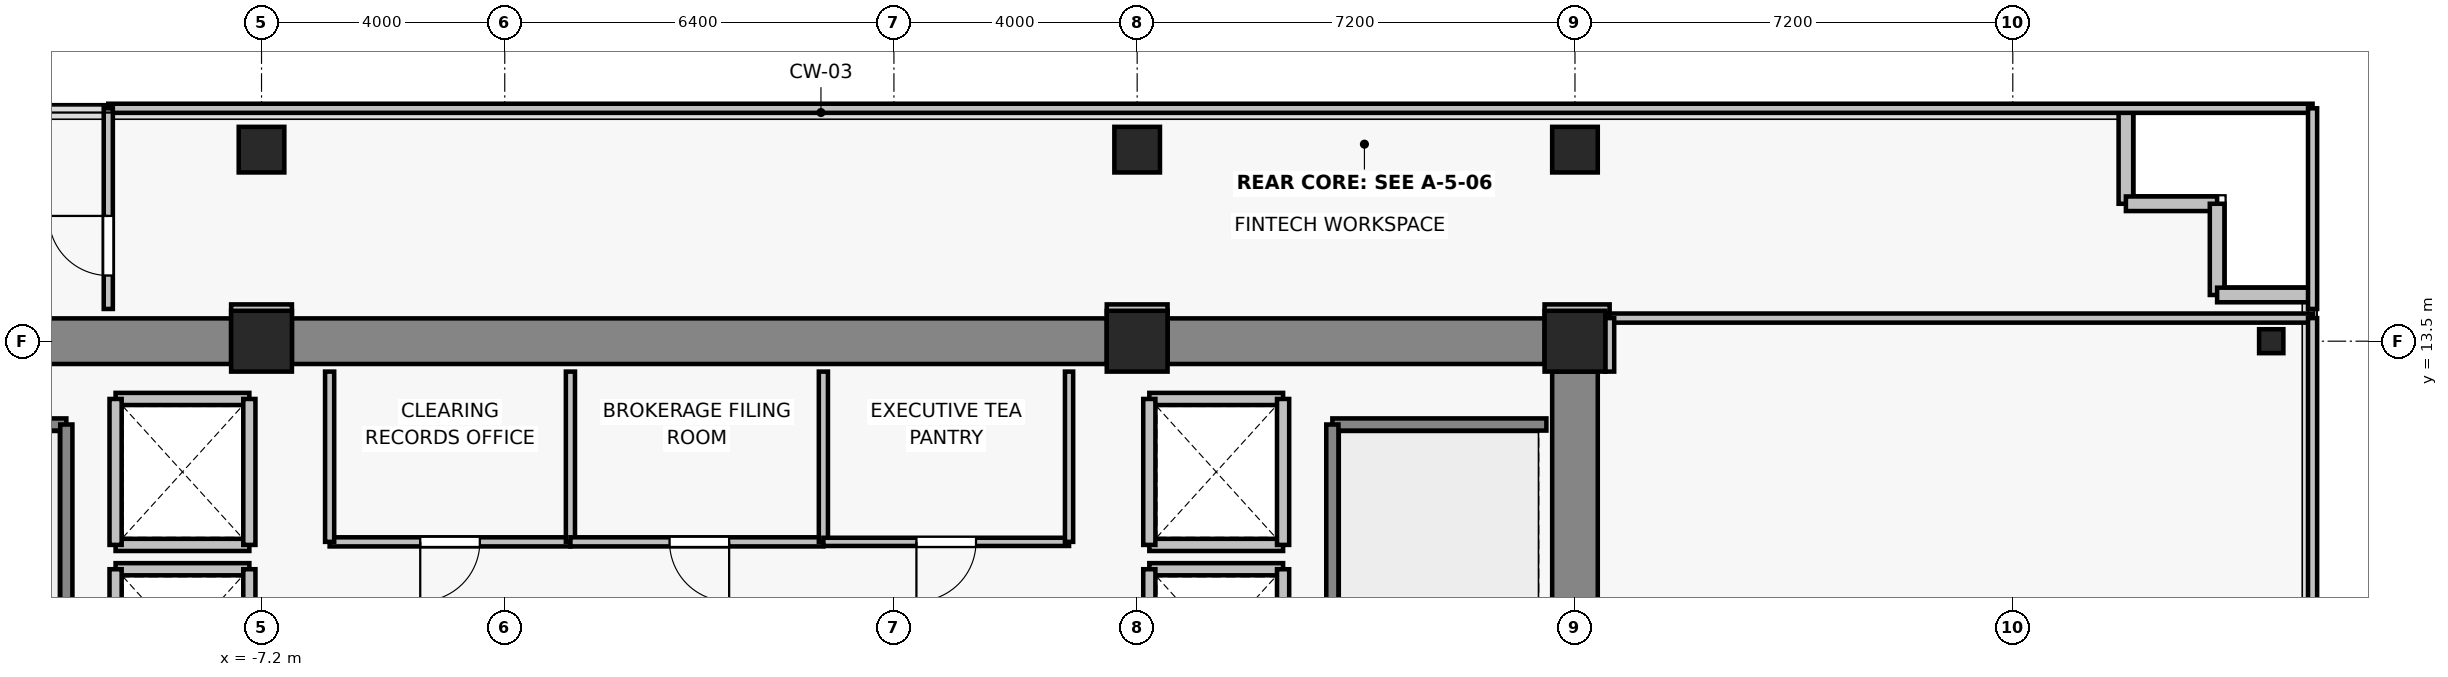
"""IFC4 building model, lengths in metres.
Left out: names, types, materials, properties, quantities, classifications, styles, units other than length and angle.
Written with IfcOpenShell. Run it as: python <this file> out.ifc"""

import sys

from ifc_helpers import new_model, si_unit, direction, frame, frame_2d, origin, origin_2d, place, context, subcontext, project, spatial, rectangle, i_section, extrude, source, transform, mapped, element, fill, save


model = new_model("IFC4")
c1 = context("Model", 3, precision=1e-05, world=origin(), true_north=direction((0.0, 1.0)))
c2 = subcontext(c1, "Body", "Model", "MODEL_VIEW")
j1 = project(units=[si_unit("LENGTHUNIT", "METRE"), si_unit("PLANEANGLEUNIT", "RADIAN")], contexts=[c1])
p1 = place(None, origin())
s1 = spatial("IfcSite", under=j1, at=p1, CompositionType="ELEMENT")
p2 = place(p1, origin())
s2 = spatial("IfcBuilding", under=s1, at=p2, CompositionType="ELEMENT")
p3 = place(p2, frame((0.0, 0.0, 179.2)))
s3 = spatial("IfcBuildingStorey", under=s2, at=p3, CompositionType="ELEMENT", Elevation=179.2)
for number, where, z_axis, x_axis in (
    (1, (-7.2, 13.5, 0.0), (0.0, 0.0, 1.0), (1.0, 0.0, 0.0)),
    (2, (7.2, 13.5, 0.0), (0.0, 0.0, 1.0), (1.0, 0.0, 0.0)),
    (3, (14.4, 13.5, 0.0), (0.0, 0.0, 1.0), (1.0, 0.0, 0.0)),
):
    element("IfcColumn", number, at=place(p3, frame(where, z_axis=z_axis, x_axis=x_axis)), inside=s3, PredefinedType="COLUMN", context=c2, shape_type="SweptSolid", body=[
        extrude(rectangle(XDim=1.0, YDim=1.0, at=origin_2d()), origin(), (0.0, 0.0, 1.0), 3.3),
    ])
for number, where, z_axis, x_axis in (
    (4, (-7.2, 16.65, 0.0), (0.0, 0.0, 1.0), (1.0, 0.0, 0.0)),
    (5, (7.2, 16.65, 0.0), (0.0, 0.0, 1.0), (1.0, 0.0, 0.0)),
    (6, (14.4, 16.65, 0.0), (0.0, 0.0, 1.0), (1.0, 0.0, 0.0)),
):
    element("IfcColumn", number, at=place(p3, frame(where, z_axis=z_axis, x_axis=x_axis)), inside=s3, PredefinedType="COLUMN", context=c2, shape_type="SweptSolid", body=[
        extrude(rectangle(XDim=0.75, YDim=0.75, at=origin_2d()), origin(), (0.0, 0.0, 1.0), 3.3),
    ])
p4 = place(p3, frame((25.85, 13.5, 0.0), z_axis=(0.0, 0.0, 1.0), x_axis=(1.0, 0.0, 0.0)))
e7 = element("IfcColumn", 7, at=p4, inside=s3, PredefinedType="COLUMN", context=c2, shape_type="SweptSolid", body=[
    extrude(i_section(OverallWidth=0.399, OverallDepth=0.394, WebThickness=0.023, FlangeThickness=0.037, FilletRadius=0.015, at=origin_2d()), origin(), (0.0, 0.0, 1.0), 3.3),
])
p5 = place(p3, frame((-13.9, 13.5, 0.0), z_axis=(0.0, 0.0, 1.0), x_axis=(1.0, 0.0, 0.0)))
e8 = element("IfcWall", 8, at=p5, inside=s3, PredefinedType="SHEAR", context=c2, shape_type="SweptSolid", body=[
    extrude(rectangle(XDim=6.2, YDim=0.75, at=frame_2d((3.1, 0.0))), origin(), (0.0, 0.0, 1.0), 3.075),
])
p6 = place(p3, frame((-6.7, 13.5, 0.0), z_axis=(0.0, 0.0, 1.0), x_axis=(1.0, 0.0, 0.0)))
e9 = element("IfcWall", 9, at=p6, inside=s3, PredefinedType="SHEAR", context=c2, shape_type="SweptSolid", body=[
    extrude(rectangle(XDim=13.4, YDim=0.75, at=frame_2d((6.7, 0.0))), origin(), (0.0, 0.0, 1.0), 3.075),
])
p7 = place(p3, frame((7.7, 13.5, 0.0), z_axis=(0.0, 0.0, 1.0), x_axis=(1.0, 0.0, 0.0)))
e10 = element("IfcWall", 10, at=p7, inside=s3, PredefinedType="SHEAR", context=c2, shape_type="SweptSolid", body=[
    extrude(rectangle(XDim=6.2, YDim=0.75, at=frame_2d((3.1, 0.0))), origin(), (0.0, 0.0, 1.0), 3.075),
])
p8 = place(p3, frame((14.4, 7.1, 0.0), z_axis=(0.0, 0.0, 1.0), x_axis=(0.0, 1.0, 0.0)))
e11 = element("IfcWall", 11, at=p8, inside=s3, PredefinedType="SHEAR", context=c2, shape_type="SweptSolid", body=[
    extrude(rectangle(XDim=5.9, YDim=0.75, at=frame_2d((2.95, 0.0))), origin(), (0.0, 0.0, 1.0), 3.075),
])
for number, where, z_axis, x_axis in (
    (12, (23.46, 15.76, 0.0), (0.0, 0.0, 1.0), (0.0, 1.0, 0.0)),
    (13, (24.96, 15.76, 0.0), (0.0, 0.0, 1.0), (-1.0, 0.0, 0.0)),
    (14, (24.96, 14.26, 0.0), (0.0, 0.0, 1.0), (0.0, 1.0, 0.0)),
    (15, (26.46, 14.26, 0.0), (0.0, 0.0, 1.0), (-1.0, 0.0, 0.0)),
):
    element("IfcWall", number, at=place(p3, frame(where, z_axis=z_axis, x_axis=x_axis)), inside=s3, PredefinedType="SOLIDWALL", context=c2, shape_type="SweptSolid", body=[
        extrude(rectangle(XDim=1.5, YDim=0.24, at=frame_2d((0.75, 0.0))), origin(), (0.0, 0.0, 1.0), 3.075),
    ])
p9 = place(p3, frame((-9.6, 9.75, 0.0), z_axis=(0.0, 0.0, 1.0), x_axis=(1.0, 0.0, 0.0)))
e16 = element("IfcWall", 16, at=p9, inside=s3, PredefinedType="SOLIDWALL", context=c2, shape_type="SweptSolid", body=[
    extrude(rectangle(XDim=2.2, YDim=0.2, at=frame_2d((1.1, 0.0))), origin(), (0.0, 0.0, 1.0), 2.565),
])
p10 = place(p3, frame((-9.6, 7.35, 0.0), z_axis=(0.0, 0.0, 1.0), x_axis=(0.0, 1.0, 0.0)))
e17 = element("IfcWall", 17, at=p10, inside=s3, PredefinedType="SOLIDWALL", context=c2, shape_type="SweptSolid", body=[
    extrude(rectangle(XDim=2.4, YDim=0.2, at=frame_2d((1.2, 0.0))), origin(), (0.0, 0.0, 1.0), 3.075),
])
p11 = place(p3, frame((-7.4, 9.75, 0.0), z_axis=(0.0, 0.0, 1.0), x_axis=(0.0, -1.0, 0.0)))
e18 = element("IfcWall", 18, at=p11, inside=s3, PredefinedType="SOLIDWALL", context=c2, shape_type="SweptSolid", body=[
    extrude(rectangle(XDim=2.4, YDim=0.2, at=frame_2d((1.2, 0.0))), origin(), (0.0, 0.0, 1.0), 2.565),
])
for number, where, z_axis, x_axis in (
    (19, (-7.4, 10.15, 0.0), (0.0, 0.0, 1.0), (-1.0, 0.0, 0.0)),
    (20, (-9.6, 12.55, 0.0), (0.0, 0.0, 1.0), (1.0, 0.0, 0.0)),
):
    element("IfcWall", number, at=place(p3, frame(where, z_axis=z_axis, x_axis=x_axis)), inside=s3, PredefinedType="SOLIDWALL", context=c2, shape_type="SweptSolid", body=[
        extrude(rectangle(XDim=2.2, YDim=0.2, at=frame_2d((1.1, 0.0))), origin(), (0.0, 0.0, 1.0), 2.565),
    ])
p12 = place(p3, frame((-9.6, 10.15, 0.0), z_axis=(0.0, 0.0, 1.0), x_axis=(0.0, 1.0, 0.0)))
e21 = element("IfcWall", 21, at=p12, inside=s3, PredefinedType="SOLIDWALL", context=c2, shape_type="SweptSolid", body=[
    extrude(rectangle(XDim=2.4, YDim=0.2, at=frame_2d((1.2, 0.0))), origin(), (0.0, 0.0, 1.0), 3.075),
])
p13 = place(p3, frame((-7.4, 12.55, 0.0), z_axis=(0.0, 0.0, 1.0), x_axis=(0.0, -1.0, 0.0)))
e22 = element("IfcWall", 22, at=p13, inside=s3, PredefinedType="SOLIDWALL", context=c2, shape_type="SweptSolid", body=[
    extrude(rectangle(XDim=2.4, YDim=0.2, at=frame_2d((1.2, 0.0))), origin(), (0.0, 0.0, 1.0), 2.565),
])
p14 = place(p3, frame((7.4, 9.75, 0.0), z_axis=(0.0, 0.0, 1.0), x_axis=(1.0, 0.0, 0.0)))
e23 = element("IfcWall", 23, at=p14, inside=s3, PredefinedType="SOLIDWALL", context=c2, shape_type="SweptSolid", body=[
    extrude(rectangle(XDim=2.2, YDim=0.2, at=frame_2d((1.1, 0.0))), origin(), (0.0, 0.0, 1.0), 2.565),
])
p15 = place(p3, frame((7.4, 7.35, 0.0), z_axis=(0.0, 0.0, 1.0), x_axis=(0.0, 1.0, 0.0)))
e24 = element("IfcWall", 24, at=p15, inside=s3, PredefinedType="SOLIDWALL", context=c2, shape_type="SweptSolid", body=[
    extrude(rectangle(XDim=2.4, YDim=0.2, at=frame_2d((1.2, 0.0))), origin(), (0.0, 0.0, 1.0), 2.565),
])
p16 = place(p3, frame((9.6, 9.75, 0.0), z_axis=(0.0, 0.0, 1.0), x_axis=(0.0, -1.0, 0.0)))
e25 = element("IfcWall", 25, at=p16, inside=s3, PredefinedType="SOLIDWALL", context=c2, shape_type="SweptSolid", body=[
    extrude(rectangle(XDim=2.4, YDim=0.2, at=frame_2d((1.2, 0.0))), origin(), (0.0, 0.0, 1.0), 3.075),
])
for number, where, z_axis, x_axis in (
    (26, (9.6, 10.15, 0.0), (0.0, 0.0, 1.0), (-1.0, 0.0, 0.0)),
    (27, (7.4, 12.55, 0.0), (0.0, 0.0, 1.0), (1.0, 0.0, 0.0)),
):
    element("IfcWall", number, at=place(p3, frame(where, z_axis=z_axis, x_axis=x_axis)), inside=s3, PredefinedType="SOLIDWALL", context=c2, shape_type="SweptSolid", body=[
        extrude(rectangle(XDim=2.2, YDim=0.2, at=frame_2d((1.1, 0.0))), origin(), (0.0, 0.0, 1.0), 2.565),
    ])
p17 = place(p3, frame((7.4, 10.15, 0.0), z_axis=(0.0, 0.0, 1.0), x_axis=(0.0, 1.0, 0.0)))
e28 = element("IfcWall", 28, at=p17, inside=s3, PredefinedType="SOLIDWALL", context=c2, shape_type="SweptSolid", body=[
    extrude(rectangle(XDim=2.4, YDim=0.2, at=frame_2d((1.2, 0.0))), origin(), (0.0, 0.0, 1.0), 2.565),
])
p18 = place(p3, frame((9.6, 12.55, 0.0), z_axis=(0.0, 0.0, 1.0), x_axis=(0.0, -1.0, 0.0)))
e29 = element("IfcWall", 29, at=p18, inside=s3, PredefinedType="SOLIDWALL", context=c2, shape_type="SweptSolid", body=[
    extrude(rectangle(XDim=2.4, YDim=0.2, at=frame_2d((1.2, 0.0))), origin(), (0.0, 0.0, 1.0), 3.075),
])
p19 = place(p3, frame((-13.93, 12.13, 0.0), z_axis=(0.0, 0.0, 1.0), x_axis=(1.0, 0.0, 0.0)))
e30 = element("IfcWall", 30, at=p19, inside=s3, PredefinedType="SOLIDWALL", context=c2, shape_type="SweptSolid", body=[
    extrude(rectangle(XDim=3.52, YDim=0.2, at=frame_2d((1.76, 0.0))), origin(), (0.0, 0.0, 1.0), 3.075),
])
p20 = place(p3, frame((-10.41, 12.13, 0.0), z_axis=(0.0, 0.0, 1.0), x_axis=(0.0, -1.0, 0.0)))
e31 = element("IfcWall", 31, at=p20, inside=s3, PredefinedType="SOLIDWALL", context=c2, shape_type="SweptSolid", body=[
    extrude(rectangle(XDim=8.84, YDim=0.2, at=frame_2d((4.42, 0.0))), origin(), (0.0, 0.0, 1.0), 3.075),
])
p21 = place(p3, frame((10.41, 12.13, 0.0), z_axis=(0.0, 0.0, 1.0), x_axis=(1.0, 0.0, 0.0)))
e32 = element("IfcWall", 32, at=p21, inside=s3, PredefinedType="SOLIDWALL", context=c2, shape_type="SweptSolid", body=[
    extrude(rectangle(XDim=3.52, YDim=0.2, at=frame_2d((1.76, 0.0))), origin(), (0.0, 0.0, 1.0), 3.075),
])
p22 = place(p3, frame((10.41, 3.29, 0.0), z_axis=(0.0, 0.0, 1.0), x_axis=(0.0, 1.0, 0.0)))
e33 = element("IfcWall", 33, at=p22, inside=s3, PredefinedType="SOLIDWALL", context=c2, shape_type="SweptSolid", body=[
    extrude(rectangle(XDim=8.84, YDim=0.2, at=frame_2d((4.42, 0.0))), origin(), (0.0, 0.0, 1.0), 3.075),
])
p23 = place(p3, frame((-2.12, 10.2, 0.0), z_axis=(0.0, 0.0, 1.0), x_axis=(-1.0, 0.0, 0.0)))
e34 = element("IfcWall", 34, at=p23, inside=s3, PredefinedType="PARTITIONING", context=c2, shape_type="SweptSolid", body=[
    extrude(rectangle(XDim=3.96, YDim=0.15, at=frame_2d((1.98, 0.0))), origin(), (0.0, 0.0, 1.0), 3.075),
])
p24 = place(p23, frame((1.49, 0.0, 0.0)))
e35 = element("IfcOpeningElement", 35, at=p24, cuts=e34, PredefinedType="OPENING", context=c2, shape_type="SweptSolid", body=[
    extrude(rectangle(XDim=0.98, YDim=2.15, at=frame_2d((0.49, 1.075))), frame((0.0, 0.085, 0.0), z_axis=(0.0, -1.0, 0.0), x_axis=(1.0, 0.0, 0.0)), (0.0, 0.0, 1.0), 0.17),
])
for number, where, z_axis, x_axis in (
    (36, (-6.08, 10.2, 0.0), (0.0, 0.0, 1.0), (0.0, 1.0, 0.0)),
    (37, (-2.12, 13.0, 0.0), (0.0, 0.0, 1.0), (0.0, -1.0, 0.0)),
):
    element("IfcWall", number, at=place(p3, frame(where, z_axis=z_axis, x_axis=x_axis)), inside=s3, PredefinedType="PARTITIONING", context=c2, shape_type="SweptSolid", body=[
        extrude(rectangle(XDim=2.8, YDim=0.15, at=frame_2d((1.4, 0.0))), origin(), (0.0, 0.0, 1.0), 3.075),
    ])
p25 = place(p3, frame((2.04, 10.2, 0.0), z_axis=(0.0, 0.0, 1.0), x_axis=(-1.0, 0.0, 0.0)))
e38 = element("IfcWall", 38, at=p25, inside=s3, PredefinedType="PARTITIONING", context=c2, shape_type="SweptSolid", body=[
    extrude(rectangle(XDim=4.16, YDim=0.15, at=frame_2d((2.08, 0.0))), origin(), (0.0, 0.0, 1.0), 3.075),
])
p26 = place(p25, frame((1.55, 0.0, 0.0)))
e39 = element("IfcOpeningElement", 39, at=p26, cuts=e38, PredefinedType="OPENING", context=c2, shape_type="SweptSolid", body=[
    extrude(rectangle(XDim=0.98, YDim=2.15, at=frame_2d((0.49, 1.075))), frame((0.0, 0.085, 0.0), z_axis=(0.0, -1.0, 0.0), x_axis=(1.0, 0.0, 0.0)), (0.0, 0.0, 1.0), 0.17),
])
p27 = place(p3, frame((2.04, 13.0, 0.0), z_axis=(0.0, 0.0, 1.0), x_axis=(0.0, -1.0, 0.0)))
e40 = element("IfcWall", 40, at=p27, inside=s3, PredefinedType="PARTITIONING", context=c2, shape_type="SweptSolid", body=[
    extrude(rectangle(XDim=2.8, YDim=0.15, at=frame_2d((1.4, 0.0))), origin(), (0.0, 0.0, 1.0), 3.075),
])
p28 = place(p3, frame((6.08, 10.2, 0.0), z_axis=(0.0, 0.0, 1.0), x_axis=(-1.0, 0.0, 0.0)))
e41 = element("IfcWall", 41, at=p28, inside=s3, PredefinedType="PARTITIONING", context=c2, shape_type="SweptSolid", body=[
    extrude(rectangle(XDim=4.04, YDim=0.135, at=frame_2d((2.02, 0.0))), origin(), (0.0, 0.0, 1.0), 3.075),
])
p29 = place(p28, frame((1.53, 0.0, 0.0)))
e42 = element("IfcOpeningElement", 42, at=p29, cuts=e41, PredefinedType="OPENING", context=c2, shape_type="SweptSolid", body=[
    extrude(rectangle(XDim=0.98, YDim=2.15, at=frame_2d((0.49, 1.075))), frame((0.0, 0.077, 0.0), z_axis=(0.0, -1.0, 0.0), x_axis=(1.0, 0.0, 0.0)), (0.0, 0.0, 1.0), 0.155),
])
p30 = place(p3, frame((6.08, 13.0, 0.0), z_axis=(0.0, 0.0, 1.0), x_axis=(0.0, -1.0, 0.0)))
e43 = element("IfcWall", 43, at=p30, inside=s3, PredefinedType="PARTITIONING", context=c2, shape_type="SweptSolid", body=[
    extrude(rectangle(XDim=2.8, YDim=0.135, at=frame_2d((1.4, 0.0))), origin(), (0.0, 0.0, 1.0), 3.075),
])
p31 = place(p3, frame((14.97, 13.88, 0.0), z_axis=(0.0, 0.0, 1.0), x_axis=(1.0, 0.0, 0.0)))
e44 = element("IfcWall", 44, at=p31, inside=s3, PredefinedType="PARTITIONING", context=c2, shape_type="SweptSolid", body=[
    extrude(rectangle(XDim=11.56, YDim=0.15, at=frame_2d((5.78, 0.0))), origin(), (0.0, 0.0, 1.0), 3.075),
])
p32 = place(p3, frame((14.97, 13.0, 0.0), z_axis=(0.0, 0.0, 1.0), x_axis=(0.0, 1.0, 0.0)))
e45 = element("IfcWall", 45, at=p32, inside=s3, PredefinedType="PARTITIONING", context=c2, shape_type="SweptSolid", body=[
    extrude(rectangle(XDim=0.88, YDim=0.15, at=frame_2d((0.44, 0.0))), origin(), (0.0, 0.0, 1.0), 2.565),
])
p33 = place(p3, frame((26.53, 13.88, 0.0), z_axis=(0.0, 0.0, 1.0), x_axis=(0.0, -1.0, 0.0)))
e46 = element("IfcWall", 46, at=p33, inside=s3, PredefinedType="PARTITIONING", context=c2, shape_type="SweptSolid", body=[
    extrude(rectangle(XDim=15.65, YDim=0.15, at=frame_2d((7.825, 0.0))), origin(), (0.0, 0.0, 1.0), 3.075),
])
for number, where, z_axis, x_axis in (
    (47, (-6.7, 14.03, 0.0), (0.0, 0.0, 1.0), (-1.0, 0.0, 0.0)),
    (48, (7.7, 14.03, 0.0), (0.0, 0.0, 1.0), (-1.0, 0.0, 0.0)),
):
    element("IfcWall", number, at=place(p3, frame(where, z_axis=z_axis, x_axis=x_axis)), inside=s3, PredefinedType="PARTITIONING", context=c2, shape_type="SweptSolid", body=[
        extrude(rectangle(XDim=1.0, YDim=0.15, at=frame_2d((0.5, 0.0))), origin(), (0.0, 0.0, 1.0), 2.565),
    ])
p34 = place(p3, frame((14.97, 14.03, 0.0), z_axis=(0.0, 0.0, 1.0), x_axis=(-1.0, 0.0, 0.0)))
e49 = element("IfcWall", 49, at=p34, inside=s3, PredefinedType="PARTITIONING", context=c2, shape_type="SweptSolid", body=[
    extrude(rectangle(XDim=1.07, YDim=0.15, at=frame_2d((0.535, 0.0))), origin(), (0.0, 0.0, 1.0), 2.565),
])
p35 = place(p3, frame((-9.72, 17.33, 0.0), z_axis=(0.0, 0.0, 1.0), x_axis=(1.0, 0.0, 0.0)))
e50 = element("IfcWall", 50, at=p35, inside=s3, PredefinedType="PARTITIONING", context=c2, shape_type="SweptSolid", body=[
    extrude(rectangle(XDim=36.25, YDim=0.15, at=frame_2d((18.125, 0.0))), origin(), (0.0, 0.0, 1.0), 3.075),
])
p36 = place(p3, frame((-9.72, 14.03, 0.0), z_axis=(0.0, 0.0, 1.0), x_axis=(0.0, 1.0, 0.0)))
e51 = element("IfcWall", 51, at=p36, inside=s3, PredefinedType="PARTITIONING", context=c2, shape_type="SweptSolid", body=[
    extrude(rectangle(XDim=3.3, YDim=0.15, at=frame_2d((1.65, 0.0))), origin(), (0.0, 0.0, 1.0), 2.565),
])
p37 = place(p36, frame((0.55, 0.0, 0.0)))
e52 = element("IfcOpeningElement", 52, at=p37, cuts=e51, PredefinedType="OPENING", context=c2, shape_type="SweptSolid", body=[
    extrude(rectangle(XDim=0.98, YDim=2.15, at=frame_2d((0.49, 1.075))), frame((0.0, 0.085, 0.0), z_axis=(0.0, -1.0, 0.0), x_axis=(1.0, 0.0, 0.0)), (0.0, 0.0, 1.0), 0.17),
])
p38 = place(p3, frame((26.53, 17.33, 0.0), z_axis=(0.0, 0.0, 1.0), x_axis=(0.0, -1.0, 0.0)))
e53 = element("IfcWall", 53, at=p38, inside=s3, PredefinedType="PARTITIONING", context=c2, shape_type="SweptSolid", body=[
    extrude(rectangle(XDim=3.3, YDim=0.15, at=frame_2d((1.65, 0.0))), origin(), (0.0, 0.0, 1.0), 3.075),
])
m1 = source(origin(), c2, "Body", "SweptSolid", [
    extrude(rectangle(XDim=0.98, YDim=2.15, at=frame_2d((0.49, 1.075))), frame((0.0, 0.025, 0.0), z_axis=(0.0, -1.0, 0.0), x_axis=(1.0, 0.0, 0.0)), (0.0, 0.0, 1.0), 0.05),
])
p39 = place(p24, origin())
e54 = element("IfcDoor", 54, at=p39, inside=s3, OperationType="SINGLE_SWING_RIGHT", PredefinedType="DOOR", context=c2, shape_type="MappedRepresentation", body=[
    mapped(m1, transform((0.0, 0.0, 0.0), x_axis=(1.0, 0.0, 0.0), y_axis=(0.0, 1.0, 0.0), z_axis=(0.0, 0.0, 1.0), scale=1.0)),
])
fill(e35, e54)
p40 = place(p26, origin())
e55 = element("IfcDoor", 55, at=p40, inside=s3, OperationType="SINGLE_SWING_LEFT", PredefinedType="DOOR", context=c2, shape_type="MappedRepresentation", body=[
    mapped(m1, transform((0.0, 0.0, 0.0), x_axis=(1.0, 0.0, 0.0), y_axis=(0.0, 1.0, 0.0), z_axis=(0.0, 0.0, 1.0), scale=1.0)),
])
fill(e39, e55)
p41 = place(p29, origin())
e56 = element("IfcDoor", 56, at=p41, inside=s3, OperationType="SINGLE_SWING_RIGHT", PredefinedType="DOOR", context=c2, shape_type="MappedRepresentation", body=[
    mapped(m1, transform((0.0, 0.0, 0.0), x_axis=(1.0, 0.0, 0.0), y_axis=(0.0, 1.0, 0.0), z_axis=(0.0, 0.0, 1.0), scale=1.0)),
])
fill(e42, e56)
p42 = place(p37, origin())
e57 = element("IfcDoor", 57, at=p42, inside=s3, OperationType="SINGLE_SWING_RIGHT", PredefinedType="DOOR", context=c2, shape_type="MappedRepresentation", body=[
    mapped(m1, transform((0.0, 0.0, 0.0), x_axis=(1.0, 0.0, 0.0), y_axis=(0.0, 1.0, 0.0), z_axis=(0.0, 0.0, 1.0), scale=1.0)),
])
fill(e52, e57)
save(model, sys.argv[1])
